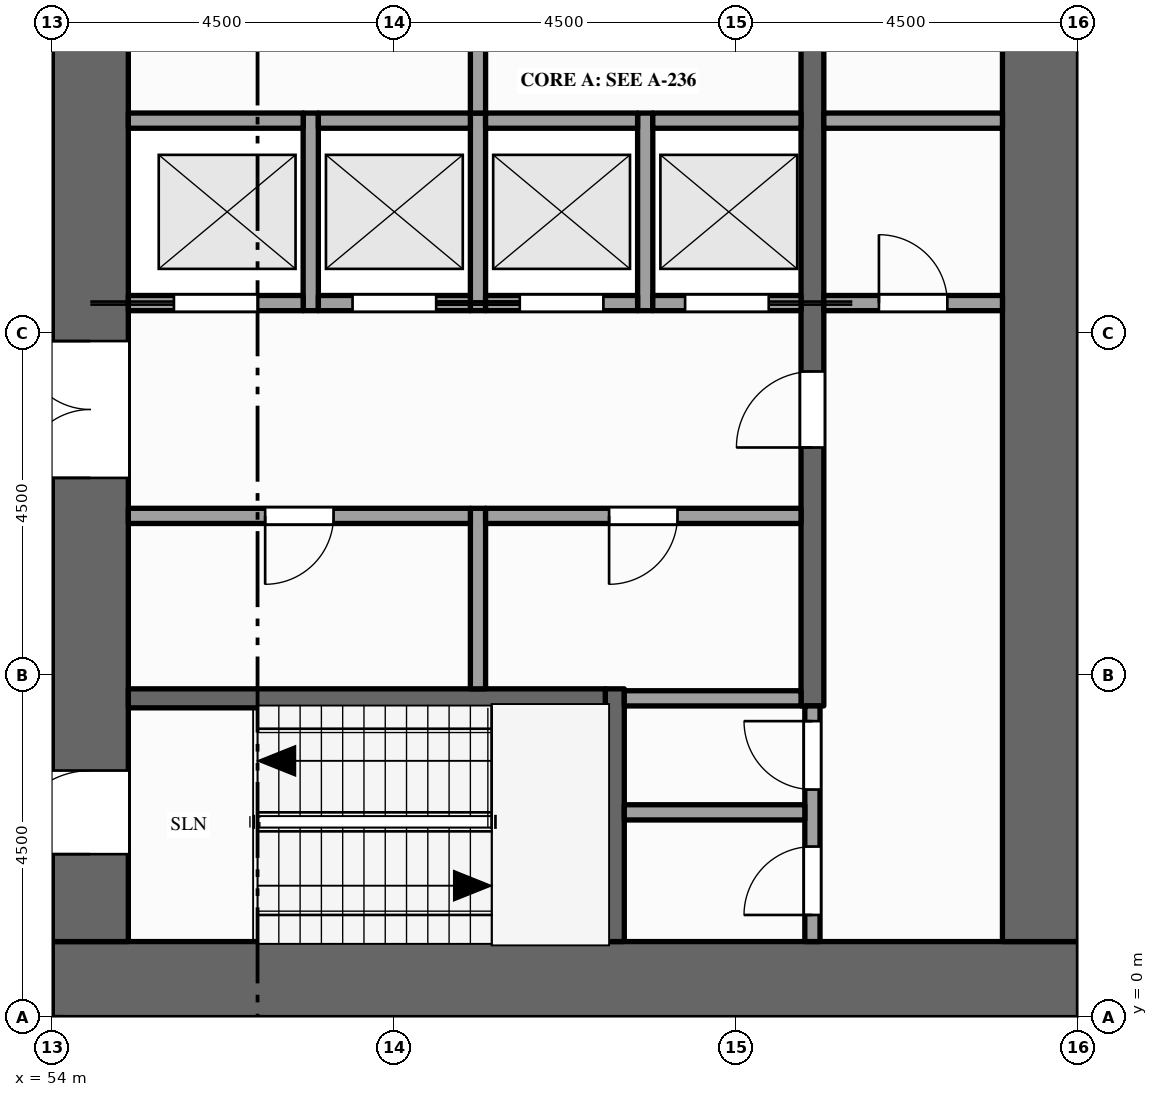
"""IFC4 building model, lengths in metres.
Left out: names, types, materials, properties, quantities, classifications, styles, units other than length and angle.
Written with IfcOpenShell. Run it as: python <this file> out.ifc"""

import sys

from ifc_helpers import new_model, si_unit, direction, frame, frame_2d, origin, place, context, subcontext, project, spatial, rectangle, extrude, element, fill, save


model = new_model("IFC4")
c1 = context("Model", 3, precision=1e-05, world=origin(), true_north=direction((0.0, 1.0)))
c2 = subcontext(c1, "Body", "Model", "MODEL_VIEW")
j1 = project(units=[si_unit("LENGTHUNIT", "METRE"), si_unit("PLANEANGLEUNIT", "RADIAN")], contexts=[c1])
p1 = place(None, origin())
s1 = spatial("IfcSite", under=j1, at=p1, CompositionType="ELEMENT")
p2 = place(p1, origin())
s2 = spatial("IfcBuilding", under=s1, at=p2, CompositionType="ELEMENT")
p3 = place(p2, frame((0.0, 0.0, 199.0)))
s3 = spatial("IfcBuildingStorey", under=s2, at=p3, CompositionType="ELEMENT", Elevation=199.0)
p4 = place(p3, frame((67.5, 0.5, -0.15), z_axis=(0.0, 0.0, 1.0), x_axis=(-1.0, 0.0, 0.0)))
e1 = element("IfcWall", 1, at=p4, inside=s3, PredefinedType="SHEAR", context=c2, shape_type="SweptSolid", body=[
    extrude(rectangle(XDim=13.5, YDim=1.0, at=frame_2d((6.75, 0.0))), origin(), (0.0, 0.0, 1.0), 4.0),
])
p5 = place(p3, frame((54.5, 1.0, -0.15), z_axis=(0.0, 0.0, 1.0), x_axis=(0.0, 1.0, 0.0)))
e2 = element("IfcWall", 2, at=p5, inside=s3, PredefinedType="SHEAR", context=c2, shape_type="SweptSolid", body=[
    extrude(rectangle(XDim=20.5, YDim=1.0, at=frame_2d((10.25, 0.0))), origin(), (0.0, 0.0, 1.0), 4.0),
])
p6 = place(p5, frame((6.1, 0.0, 0.15)))
e3 = element("IfcOpeningElement", 3, at=p6, cuts=e2, PredefinedType="OPENING", context=c2, shape_type="SweptSolid", body=[
    extrude(rectangle(XDim=1.8, YDim=2.1, at=frame_2d((0.9, 1.05))), frame((0.0, 0.51, 0.0), z_axis=(0.0, -1.0, 0.0), x_axis=(1.0, 0.0, 0.0)), (0.0, 0.0, 1.0), 1.02),
])
p7 = place(p5, frame((12.15, 0.0, 0.15)))
e4 = element("IfcOpeningElement", 4, at=p7, cuts=e2, PredefinedType="OPENING", context=c2, shape_type="SweptSolid", body=[
    extrude(rectangle(XDim=1.1, YDim=2.1, at=frame_2d((0.55, 1.05))), frame((0.0, 0.51, 0.0), z_axis=(0.0, -1.0, 0.0), x_axis=(1.0, 0.0, 0.0)), (0.0, 0.0, 1.0), 1.02),
])
p8 = place(p5, frame((1.15, 0.0, 0.15)))
e5 = element("IfcOpeningElement", 5, at=p8, cuts=e2, PredefinedType="OPENING", context=c2, shape_type="SweptSolid", body=[
    extrude(rectangle(XDim=1.1, YDim=2.1, at=frame_2d((0.55, 1.05))), frame((0.0, 0.51, 0.0), z_axis=(0.0, -1.0, 0.0), x_axis=(1.0, 0.0, 0.0)), (0.0, 0.0, 1.0), 1.02),
])
p9 = place(p5, frame((18.35, 0.0, 0.15)))
e6 = element("IfcOpeningElement", 6, at=p9, cuts=e2, PredefinedType="OPENING", context=c2, shape_type="SweptSolid", body=[
    extrude(rectangle(XDim=1.1, YDim=2.1, at=frame_2d((0.55, 1.05))), frame((0.0, 0.51, 0.0), z_axis=(0.0, -1.0, 0.0), x_axis=(1.0, 0.0, 0.0)), (0.0, 0.0, 1.0), 1.02),
])
p10 = place(p3, frame((67.0, 1.0, -0.15), z_axis=(0.0, 0.0, 1.0), x_axis=(0.0, 1.0, 0.0)))
e7 = element("IfcWall", 7, at=p10, inside=s3, PredefinedType="SHEAR", context=c2, shape_type="SweptSolid", body=[
    extrude(rectangle(XDim=20.5, YDim=1.0, at=frame_2d((10.25, 0.0))), origin(), (0.0, 0.0, 1.0), 4.0),
])
p11 = place(p3, frame((57.4, 9.3, 0.0), z_axis=(0.0, 0.0, 1.0), x_axis=(0.0, 1.0, 0.0)))
e8 = element("IfcWall", 8, at=p11, inside=s3, PredefinedType="SOLIDWALL", context=c2, shape_type="SweptSolid", body=[
    extrude(rectangle(XDim=2.6, YDim=0.2, at=frame_2d((1.3, 0.0))), origin(), (0.0, 0.0, 1.0), 3.85),
])
p12 = place(p3, frame((59.6, 4.325, 0.0), z_axis=(0.0, 0.0, 1.0), x_axis=(0.0, 1.0, 0.0)))
e9 = element("IfcWall", 9, at=p12, inside=s3, PredefinedType="PARTITIONING", context=c2, shape_type="SweptSolid", body=[
    extrude(rectangle(XDim=2.375, YDim=0.2, at=frame_2d((1.188, 0.0))), origin(), (0.0, 0.0, 1.0), 3.85),
])
p13 = place(p3, frame((59.6, 9.3, 0.0), z_axis=(0.0, 0.0, 1.0), x_axis=(0.0, 1.0, 0.0)))
e10 = element("IfcWall", 10, at=p13, inside=s3, PredefinedType="SOLIDWALL", context=c2, shape_type="SweptSolid", body=[
    extrude(rectangle(XDim=2.6, YDim=0.2, at=frame_2d((1.3, 0.0))), origin(), (0.0, 0.0, 1.0), 3.85),
])
p14 = place(p3, frame((59.6, 11.9, 0.0), z_axis=(0.0, 0.0, 1.0), x_axis=(0.0, 1.0, 0.0)))
e11 = element("IfcWall", 11, at=p14, inside=s3, PredefinedType="PARTITIONING", context=c2, shape_type="SweptSolid", body=[
    extrude(rectangle(XDim=3.6, YDim=0.2, at=frame_2d((1.8, 0.0))), origin(), (0.0, 0.0, 1.0), 3.85),
])
p15 = place(p14, frame((1.3, 0.0, 0.0)))
e12 = element("IfcOpeningElement", 12, at=p15, cuts=e11, PredefinedType="OPENING", context=c2, shape_type="SweptSolid", body=[
    extrude(rectangle(XDim=1.0, YDim=2.1, at=frame_2d((0.5, 1.05))), frame((0.0, 0.11, 0.0), z_axis=(0.0, -1.0, 0.0), x_axis=(1.0, 0.0, 0.0)), (0.0, 0.0, 1.0), 0.22),
])
p16 = place(p3, frame((61.4, 1.0, 0.0), z_axis=(0.0, 0.0, 1.0), x_axis=(0.0, 1.0, 0.0)))
e13 = element("IfcWall", 13, at=p16, inside=s3, PredefinedType="SHEAR", context=c2, shape_type="SweptSolid", body=[
    extrude(rectangle(XDim=3.325, YDim=0.25, at=frame_2d((1.663, 0.0))), origin(), (0.0, 0.0, 1.0), 3.85),
])
p17 = place(p3, frame((61.8, 9.3, 0.0), z_axis=(0.0, 0.0, 1.0), x_axis=(0.0, 1.0, 0.0)))
e14 = element("IfcWall", 14, at=p17, inside=s3, PredefinedType="SOLIDWALL", context=c2, shape_type="SweptSolid", body=[
    extrude(rectangle(XDim=2.6, YDim=0.2, at=frame_2d((1.3, 0.0))), origin(), (0.0, 0.0, 1.0), 3.85),
])
p18 = place(p3, frame((64.0, 1.0, 0.0), z_axis=(0.0, 0.0, 1.0), x_axis=(0.0, 1.0, 0.0)))
e15 = element("IfcWall", 15, at=p18, inside=s3, PredefinedType="PARTITIONING", context=c2, shape_type="SweptSolid", body=[
    extrude(rectangle(XDim=3.1, YDim=0.2, at=frame_2d((1.55, 0.0))), origin(), (0.0, 0.0, 1.0), 3.85),
])
p19 = place(p18, frame((0.35, 0.0, 0.0)))
e16 = element("IfcOpeningElement", 16, at=p19, cuts=e15, PredefinedType="OPENING", context=c2, shape_type="SweptSolid", body=[
    extrude(rectangle(XDim=0.9, YDim=2.1, at=frame_2d((0.45, 1.05))), frame((0.0, 0.11, 0.0), z_axis=(0.0, -1.0, 0.0), x_axis=(1.0, 0.0, 0.0)), (0.0, 0.0, 1.0), 0.22),
])
p20 = place(p18, frame((2.0, 0.0, 0.0)))
e17 = element("IfcOpeningElement", 17, at=p20, cuts=e15, PredefinedType="OPENING", context=c2, shape_type="SweptSolid", body=[
    extrude(rectangle(XDim=0.9, YDim=2.1, at=frame_2d((0.45, 1.05))), frame((0.0, 0.11, 0.0), z_axis=(0.0, -1.0, 0.0), x_axis=(1.0, 0.0, 0.0)), (0.0, 0.0, 1.0), 0.22),
])
p21 = place(p3, frame((64.0, 4.1, 0.0), z_axis=(0.0, 0.0, 1.0), x_axis=(0.0, 1.0, 0.0)))
e18 = element("IfcWall", 18, at=p21, inside=s3, PredefinedType="SHEAR", context=c2, shape_type="SweptSolid", body=[
    extrude(rectangle(XDim=14.5, YDim=0.3, at=frame_2d((7.25, 0.0))), origin(), (0.0, 0.0, 1.0), 3.85),
])
p22 = place(p21, frame((3.4, 0.0, 0.0)))
e19 = element("IfcOpeningElement", 19, at=p22, cuts=e18, PredefinedType="OPENING", context=c2, shape_type="SweptSolid", body=[
    extrude(rectangle(XDim=1.0, YDim=2.1, at=frame_2d((0.5, 1.05))), frame((0.0, 0.16, 0.0), z_axis=(0.0, -1.0, 0.0), x_axis=(1.0, 0.0, 0.0)), (0.0, 0.0, 1.0), 0.32),
])
p23 = place(p21, frame((9.1, 0.0, 0.0)))
e20 = element("IfcOpeningElement", 20, at=p23, cuts=e18, PredefinedType="OPENING", context=c2, shape_type="SweptSolid", body=[
    extrude(rectangle(XDim=1.0, YDim=2.1, at=frame_2d((0.5, 1.05))), frame((0.0, 0.16, 0.0), z_axis=(0.0, -1.0, 0.0), x_axis=(1.0, 0.0, 0.0)), (0.0, 0.0, 1.0), 0.32),
])
p24 = place(p3, frame((61.525, 2.7, 0.0), z_axis=(0.0, 0.0, 1.0), x_axis=(1.0, 0.0, 0.0)))
e21 = element("IfcWall", 21, at=p24, inside=s3, PredefinedType="PARTITIONING", context=c2, shape_type="SweptSolid", body=[
    extrude(rectangle(XDim=2.375, YDim=0.2, at=frame_2d((1.188, 0.0))), origin(), (0.0, 0.0, 1.0), 3.85),
])
p25 = place(p3, frame((55.0, 4.2, 0.0), z_axis=(0.0, 0.0, 1.0), x_axis=(1.0, 0.0, 0.0)))
e22 = element("IfcWall", 22, at=p25, inside=s3, PredefinedType="SHEAR", context=c2, shape_type="SweptSolid", body=[
    extrude(rectangle(XDim=6.275, YDim=0.25, at=frame_2d((3.137, 0.0))), origin(), (0.0, 0.0, 1.0), 3.85),
])
p26 = place(p3, frame((61.525, 4.2, 0.0), z_axis=(0.0, 0.0, 1.0), x_axis=(1.0, 0.0, 0.0)))
e23 = element("IfcWall", 23, at=p26, inside=s3, PredefinedType="PARTITIONING", context=c2, shape_type="SweptSolid", body=[
    extrude(rectangle(XDim=2.325, YDim=0.2, at=frame_2d((1.163, 0.0))), origin(), (0.0, 0.0, 1.0), 3.85),
])
p27 = place(p3, frame((55.0, 6.6, 0.0), z_axis=(0.0, 0.0, 1.0), x_axis=(1.0, 0.0, 0.0)))
e24 = element("IfcWall", 24, at=p27, inside=s3, PredefinedType="PARTITIONING", context=c2, shape_type="SweptSolid", body=[
    extrude(rectangle(XDim=4.5, YDim=0.2, at=frame_2d((2.25, 0.0))), origin(), (0.0, 0.0, 1.0), 3.85),
])
p28 = place(p27, frame((1.8, 0.0, 0.0)))
e25 = element("IfcOpeningElement", 25, at=p28, cuts=e24, PredefinedType="OPENING", context=c2, shape_type="SweptSolid", body=[
    extrude(rectangle(XDim=0.9, YDim=2.1, at=frame_2d((0.45, 1.05))), frame((0.0, 0.11, 0.0), z_axis=(0.0, -1.0, 0.0), x_axis=(1.0, 0.0, 0.0)), (0.0, 0.0, 1.0), 0.22),
])
p29 = place(p3, frame((59.7, 6.6, 0.0), z_axis=(0.0, 0.0, 1.0), x_axis=(1.0, 0.0, 0.0)))
e26 = element("IfcWall", 26, at=p29, inside=s3, PredefinedType="PARTITIONING", context=c2, shape_type="SweptSolid", body=[
    extrude(rectangle(XDim=4.15, YDim=0.2, at=frame_2d((2.075, 0.0))), origin(), (0.0, 0.0, 1.0), 3.85),
])
p30 = place(p29, frame((1.625, 0.0, 0.0)))
e27 = element("IfcOpeningElement", 27, at=p30, cuts=e26, PredefinedType="OPENING", context=c2, shape_type="SweptSolid", body=[
    extrude(rectangle(XDim=0.9, YDim=2.1, at=frame_2d((0.45, 1.05))), frame((0.0, 0.11, 0.0), z_axis=(0.0, -1.0, 0.0), x_axis=(1.0, 0.0, 0.0)), (0.0, 0.0, 1.0), 0.22),
])
p31 = place(p3, frame((55.0, 9.4, 0.0), z_axis=(0.0, 0.0, 1.0), x_axis=(1.0, 0.0, 0.0)))
e28 = element("IfcWall", 28, at=p31, inside=s3, PredefinedType="SOLIDWALL", context=c2, shape_type="SweptSolid", body=[
    extrude(rectangle(XDim=2.3, YDim=0.2, at=frame_2d((1.15, 0.0))), origin(), (0.0, 0.0, 1.0), 3.85),
])
p32 = place(p31, frame((0.6, 0.0, 0.012)))
e29 = element("IfcOpeningElement", 29, at=p32, cuts=e28, PredefinedType="OPENING", context=c2, shape_type="SweptSolid", body=[
    extrude(rectangle(XDim=1.1, YDim=2.1, at=frame_2d((0.55, 1.05))), frame((0.0, 0.11, 0.0), z_axis=(0.0, -1.0, 0.0), x_axis=(1.0, 0.0, 0.0)), (0.0, 0.0, 1.0), 0.22),
])
p33 = place(p3, frame((57.5, 9.4, 0.0), z_axis=(0.0, 0.0, 1.0), x_axis=(1.0, 0.0, 0.0)))
e30 = element("IfcWall", 30, at=p33, inside=s3, PredefinedType="SOLIDWALL", context=c2, shape_type="SweptSolid", body=[
    extrude(rectangle(XDim=2.0, YDim=0.2, at=frame_2d((1.0, 0.0))), origin(), (0.0, 0.0, 1.0), 3.85),
])
p34 = place(p33, frame((0.45, 0.0, 0.012)))
e31 = element("IfcOpeningElement", 31, at=p34, cuts=e30, PredefinedType="OPENING", context=c2, shape_type="SweptSolid", body=[
    extrude(rectangle(XDim=1.1, YDim=2.1, at=frame_2d((0.55, 1.05))), frame((0.0, 0.11, 0.0), z_axis=(0.0, -1.0, 0.0), x_axis=(1.0, 0.0, 0.0)), (0.0, 0.0, 1.0), 0.22),
])
p35 = place(p3, frame((59.7, 9.4, 0.0), z_axis=(0.0, 0.0, 1.0), x_axis=(1.0, 0.0, 0.0)))
e32 = element("IfcWall", 32, at=p35, inside=s3, PredefinedType="SOLIDWALL", context=c2, shape_type="SweptSolid", body=[
    extrude(rectangle(XDim=2.0, YDim=0.2, at=frame_2d((1.0, 0.0))), origin(), (0.0, 0.0, 1.0), 3.85),
])
p36 = place(p35, frame((0.45, 0.0, 0.012)))
e33 = element("IfcOpeningElement", 33, at=p36, cuts=e32, PredefinedType="OPENING", context=c2, shape_type="SweptSolid", body=[
    extrude(rectangle(XDim=1.1, YDim=2.1, at=frame_2d((0.55, 1.05))), frame((0.0, 0.11, 0.0), z_axis=(0.0, -1.0, 0.0), x_axis=(1.0, 0.0, 0.0)), (0.0, 0.0, 1.0), 0.22),
])
p37 = place(p3, frame((61.9, 9.4, 0.0), z_axis=(0.0, 0.0, 1.0), x_axis=(1.0, 0.0, 0.0)))
e34 = element("IfcWall", 34, at=p37, inside=s3, PredefinedType="SOLIDWALL", context=c2, shape_type="SweptSolid", body=[
    extrude(rectangle(XDim=1.95, YDim=0.2, at=frame_2d((0.975, 0.0))), origin(), (0.0, 0.0, 1.0), 3.85),
])
p38 = place(p37, frame((0.425, 0.0, 0.012)))
e35 = element("IfcOpeningElement", 35, at=p38, cuts=e34, PredefinedType="OPENING", context=c2, shape_type="SweptSolid", body=[
    extrude(rectangle(XDim=1.1, YDim=2.1, at=frame_2d((0.55, 1.05))), frame((0.0, 0.11, 0.0), z_axis=(0.0, -1.0, 0.0), x_axis=(1.0, 0.0, 0.0)), (0.0, 0.0, 1.0), 0.22),
])
p39 = place(p3, frame((64.15, 9.4, 0.0), z_axis=(0.0, 0.0, 1.0), x_axis=(1.0, 0.0, 0.0)))
e36 = element("IfcWall", 36, at=p39, inside=s3, PredefinedType="PARTITIONING", context=c2, shape_type="SweptSolid", body=[
    extrude(rectangle(XDim=2.35, YDim=0.2, at=frame_2d((1.175, 0.0))), origin(), (0.0, 0.0, 1.0), 3.85),
])
p40 = place(p39, frame((0.725, 0.0, 0.0)))
e37 = element("IfcOpeningElement", 37, at=p40, cuts=e36, PredefinedType="OPENING", context=c2, shape_type="SweptSolid", body=[
    extrude(rectangle(XDim=0.9, YDim=2.1, at=frame_2d((0.45, 1.05))), frame((0.0, 0.11, 0.0), z_axis=(0.0, -1.0, 0.0), x_axis=(1.0, 0.0, 0.0)), (0.0, 0.0, 1.0), 0.22),
])
p41 = place(p3, frame((55.0, 11.8, 0.0), z_axis=(0.0, 0.0, 1.0), x_axis=(1.0, 0.0, 0.0)))
e38 = element("IfcWall", 38, at=p41, inside=s3, PredefinedType="SOLIDWALL", context=c2, shape_type="SweptSolid", body=[
    extrude(rectangle(XDim=2.3, YDim=0.2, at=frame_2d((1.15, 0.0))), origin(), (0.0, 0.0, 1.0), 3.85),
])
for number, where, z_axis, x_axis in (
    (39, (57.5, 11.8, 0.0), (0.0, 0.0, 1.0), (1.0, 0.0, 0.0)),
    (40, (59.7, 11.8, 0.0), (0.0, 0.0, 1.0), (1.0, 0.0, 0.0)),
):
    element("IfcWall", number, at=place(p3, frame(where, z_axis=z_axis, x_axis=x_axis)), inside=s3, PredefinedType="SOLIDWALL", context=c2, shape_type="SweptSolid", body=[
        extrude(rectangle(XDim=2.0, YDim=0.2, at=frame_2d((1.0, 0.0))), origin(), (0.0, 0.0, 1.0), 3.85),
    ])
p42 = place(p3, frame((61.9, 11.8, 0.0), z_axis=(0.0, 0.0, 1.0), x_axis=(1.0, 0.0, 0.0)))
e41 = element("IfcWall", 41, at=p42, inside=s3, PredefinedType="SOLIDWALL", context=c2, shape_type="SweptSolid", body=[
    extrude(rectangle(XDim=1.95, YDim=0.2, at=frame_2d((0.975, 0.0))), origin(), (0.0, 0.0, 1.0), 3.85),
])
p43 = place(p3, frame((64.15, 11.8, 0.0), z_axis=(0.0, 0.0, 1.0), x_axis=(1.0, 0.0, 0.0)))
e42 = element("IfcWall", 42, at=p43, inside=s3, PredefinedType="PARTITIONING", context=c2, shape_type="SweptSolid", body=[
    extrude(rectangle(XDim=2.35, YDim=0.2, at=frame_2d((1.175, 0.0))), origin(), (0.0, 0.0, 1.0), 3.85),
])
p44 = place(p32, origin())
e43 = element("IfcDoor", 43, at=p44, inside=s3, OperationType="SLIDING_TO_LEFT", PredefinedType="DOOR", context=c2, shape_type="SweptSolid", body=[
    extrude(rectangle(XDim=1.1, YDim=2.1, at=frame_2d((0.55, 1.05))), frame((0.0, 0.025, 0.0), z_axis=(0.0, -1.0, 0.0), x_axis=(1.0, 0.0, 0.0)), (0.0, 0.0, 1.0), 0.05),
])
fill(e29, e43)
p45 = place(p34, origin())
e44 = element("IfcDoor", 44, at=p45, inside=s3, OperationType="SLIDING_TO_RIGHT", PredefinedType="DOOR", context=c2, shape_type="SweptSolid", body=[
    extrude(rectangle(XDim=1.1, YDim=2.1, at=frame_2d((0.55, 1.05))), frame((0.0, 0.025, 0.0), z_axis=(0.0, -1.0, 0.0), x_axis=(1.0, 0.0, 0.0)), (0.0, 0.0, 1.0), 0.05),
])
fill(e31, e44)
p46 = place(p36, origin())
e45 = element("IfcDoor", 45, at=p46, inside=s3, OperationType="SLIDING_TO_LEFT", PredefinedType="DOOR", context=c2, shape_type="SweptSolid", body=[
    extrude(rectangle(XDim=1.1, YDim=2.1, at=frame_2d((0.55, 1.05))), frame((0.0, 0.025, 0.0), z_axis=(0.0, -1.0, 0.0), x_axis=(1.0, 0.0, 0.0)), (0.0, 0.0, 1.0), 0.05),
])
fill(e33, e45)
p47 = place(p38, origin())
e46 = element("IfcDoor", 46, at=p47, inside=s3, OperationType="SLIDING_TO_RIGHT", PredefinedType="DOOR", context=c2, shape_type="SweptSolid", body=[
    extrude(rectangle(XDim=1.1, YDim=2.1, at=frame_2d((0.55, 1.05))), frame((0.0, 0.025, 0.0), z_axis=(0.0, -1.0, 0.0), x_axis=(1.0, 0.0, 0.0)), (0.0, 0.0, 1.0), 0.05),
])
fill(e35, e46)
p48 = place(p6, origin())
e47 = element("IfcDoor", 47, at=p48, inside=s3, OperationType="DOUBLE_DOOR_SINGLE_SWING", PredefinedType="DOOR", context=c2, shape_type="SweptSolid", body=[
    extrude(rectangle(XDim=1.8, YDim=2.1, at=frame_2d((0.9, 1.05))), frame((0.0, 0.025, 0.0), z_axis=(0.0, -1.0, 0.0), x_axis=(1.0, 0.0, 0.0)), (0.0, 0.0, 1.0), 0.05),
])
fill(e3, e47)
p49 = place(p22, origin())
e48 = element("IfcDoor", 48, at=p49, inside=s3, OperationType="SINGLE_SWING_LEFT", PredefinedType="DOOR", context=c2, shape_type="SweptSolid", body=[
    extrude(rectangle(XDim=1.0, YDim=2.1, at=frame_2d((0.5, 1.05))), frame((0.0, 0.025, 0.0), z_axis=(0.0, -1.0, 0.0), x_axis=(1.0, 0.0, 0.0)), (0.0, 0.0, 1.0), 0.05),
])
fill(e19, e48)
p50 = place(p40, origin())
e49 = element("IfcDoor", 49, at=p50, inside=s3, OperationType="SINGLE_SWING_LEFT", PredefinedType="DOOR", context=c2, shape_type="SweptSolid", body=[
    extrude(rectangle(XDim=0.9, YDim=2.1, at=frame_2d((0.45, 1.05))), frame((0.0, 0.025, 0.0), z_axis=(0.0, -1.0, 0.0), x_axis=(1.0, 0.0, 0.0)), (0.0, 0.0, 1.0), 0.05),
])
fill(e37, e49)
p51 = place(p8, origin())
e50 = element("IfcDoor", 50, at=p51, inside=s3, OperationType="SINGLE_SWING_LEFT", PredefinedType="DOOR", context=c2, shape_type="SweptSolid", body=[
    extrude(rectangle(XDim=1.1, YDim=2.1, at=frame_2d((0.55, 1.05))), frame((0.0, 0.025, 0.0), z_axis=(0.0, -1.0, 0.0), x_axis=(1.0, 0.0, 0.0)), (0.0, 0.0, 1.0), 0.05),
])
fill(e5, e50)
p52 = place(p19, origin())
e51 = element("IfcDoor", 51, at=p52, inside=s3, OperationType="SINGLE_SWING_LEFT", PredefinedType="DOOR", context=c2, shape_type="SweptSolid", body=[
    extrude(rectangle(XDim=0.9, YDim=2.1, at=frame_2d((0.45, 1.05))), frame((0.0, 0.025, 0.0), z_axis=(0.0, -1.0, 0.0), x_axis=(1.0, 0.0, 0.0)), (0.0, 0.0, 1.0), 0.05),
])
fill(e16, e51)
p53 = place(p20, origin())
e52 = element("IfcDoor", 52, at=p53, inside=s3, OperationType="SINGLE_SWING_RIGHT", PredefinedType="DOOR", context=c2, shape_type="SweptSolid", body=[
    extrude(rectangle(XDim=0.9, YDim=2.1, at=frame_2d((0.45, 1.05))), frame((0.0, 0.025, 0.0), z_axis=(0.0, -1.0, 0.0), x_axis=(1.0, 0.0, 0.0)), (0.0, 0.0, 1.0), 0.05),
])
fill(e17, e52)
p54 = place(p28, origin())
e53 = element("IfcDoor", 53, at=p54, inside=s3, OperationType="SINGLE_SWING_LEFT", PredefinedType="DOOR", context=c2, shape_type="SweptSolid", body=[
    extrude(rectangle(XDim=0.9, YDim=2.1, at=frame_2d((0.45, 1.05))), frame((0.0, 0.025, 0.0), z_axis=(0.0, -1.0, 0.0), x_axis=(1.0, 0.0, 0.0)), (0.0, 0.0, 1.0), 0.05),
])
fill(e25, e53)
p55 = place(p30, origin())
e54 = element("IfcDoor", 54, at=p55, inside=s3, OperationType="SINGLE_SWING_LEFT", PredefinedType="DOOR", context=c2, shape_type="SweptSolid", body=[
    extrude(rectangle(XDim=0.9, YDim=2.1, at=frame_2d((0.45, 1.05))), frame((0.0, 0.025, 0.0), z_axis=(0.0, -1.0, 0.0), x_axis=(1.0, 0.0, 0.0)), (0.0, 0.0, 1.0), 0.05),
])
fill(e27, e54)
save(model, sys.argv[1])
